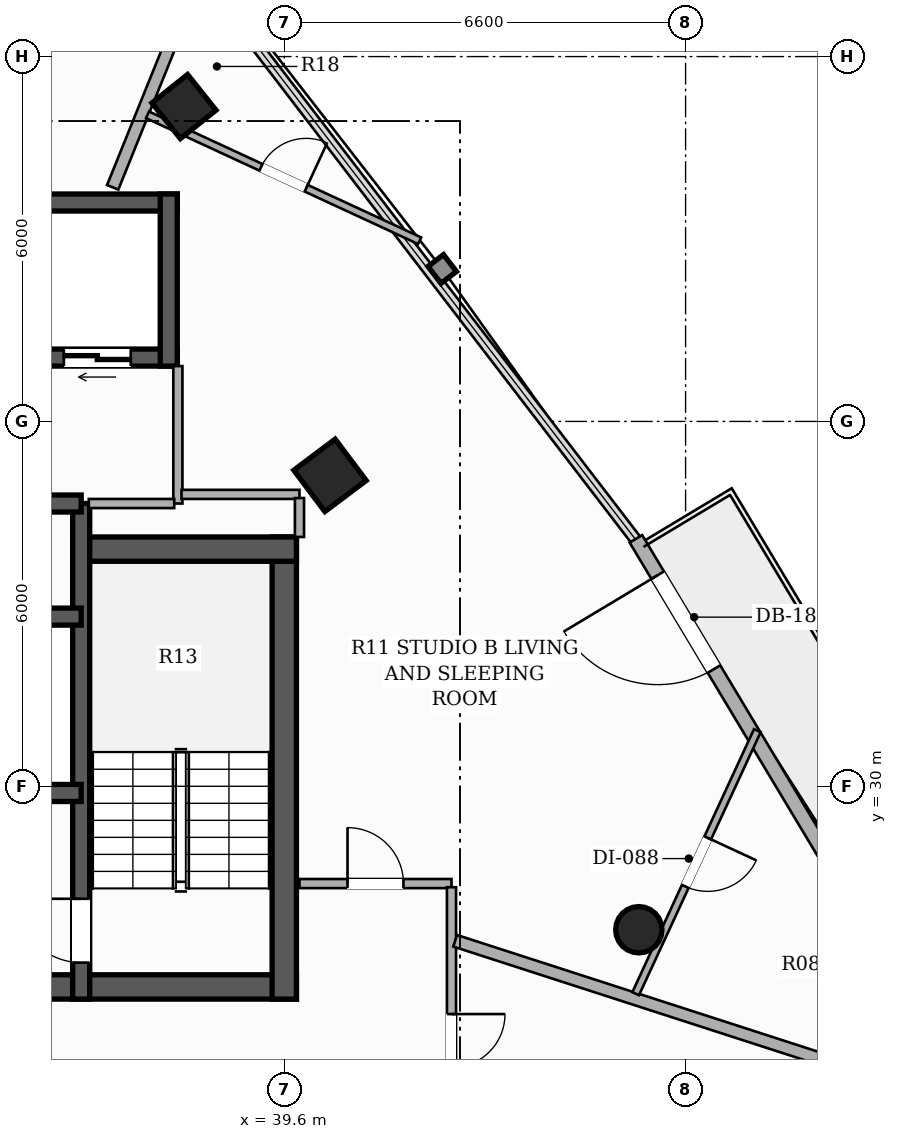
"""IFC4 building model, lengths in metres.
Left out: names, types, materials, properties, quantities, classifications, styles, units other than length and angle.
Written with IfcOpenShell. Run it as: python <this file> out.ifc"""

import sys

from ifc_helpers import new_model, si_unit, direction, frame, frame_2d, origin, origin_2d, place, context, subcontext, project, spatial, rectangle, hollow_rectangle, hollow_circle, extrude, element, fill, save


model = new_model("IFC4")
c1 = context("Model", 3, precision=1e-05, world=origin(), true_north=direction((0.0, 1.0)))
c2 = subcontext(c1, "Body", "Model", "MODEL_VIEW")
j1 = project(units=[si_unit("LENGTHUNIT", "METRE"), si_unit("PLANEANGLEUNIT", "RADIAN")], contexts=[c1])
p1 = place(None, origin())
s1 = spatial("IfcSite", under=j1, at=p1, CompositionType="ELEMENT")
p2 = place(p1, origin())
s2 = spatial("IfcBuilding", under=s1, at=p2, CompositionType="ELEMENT")
p3 = place(p2, frame((0.0, 0.0, 153.95)))
s3 = spatial("IfcBuildingStorey", under=s2, at=p3, CompositionType="ELEMENT", Elevation=153.95)
p4 = place(p3, frame((26.2, 26.7, 0.0), z_axis=(0.0, 0.0, 1.0), x_axis=(1.0, 0.0, 0.0)))
e1 = element("IfcWall", 1, at=p4, inside=s3, PredefinedType="SHEAR", context=c2, shape_type="SweptSolid", body=[
    extrude(rectangle(XDim=13.6, YDim=0.4, at=frame_2d((6.8, 0.0))), origin(), (0.0, 0.0, 1.0), 3.3),
])
p5 = place(p4, frame((4.35, 0.0, 0.0)))
e2 = element("IfcOpeningElement", 2, at=p5, cuts=e1, PredefinedType="OPENING", context=c2, shape_type="SweptSolid", body=[
    extrude(rectangle(XDim=1.05, YDim=2.15, at=frame_2d((0.525, 1.075))), frame((0.0, 0.21, 0.0), z_axis=(0.0, -1.0, 0.0), x_axis=(1.0, 0.0, 0.0)), (0.0, 0.0, 1.0), 0.42),
])
p6 = place(p4, frame((8.3, 0.0, 0.0)))
e3 = element("IfcOpeningElement", 3, at=p6, cuts=e1, PredefinedType="OPENING", context=c2, shape_type="SweptSolid", body=[
    extrude(rectangle(XDim=1.05, YDim=2.15, at=frame_2d((0.525, 1.075))), frame((0.0, 0.21, 0.0), z_axis=(0.0, -1.0, 0.0), x_axis=(1.0, 0.0, 0.0)), (0.0, 0.0, 1.0), 0.42),
])
p7 = place(p3, frame((39.6, 26.5, 0.0), z_axis=(0.0, 0.0, 1.0), x_axis=(0.0, 1.0, 0.0)))
e4 = element("IfcWall", 4, at=p7, inside=s3, PredefinedType="SHEAR", context=c2, shape_type="SweptSolid", body=[
    extrude(rectangle(XDim=7.6, YDim=0.4, at=frame_2d((3.8, 0.0))), origin(), (0.0, 0.0, 1.0), 3.3),
])
p8 = place(p3, frame((36.12, 33.9, 0.0), z_axis=(0.0, 0.0, 1.0), x_axis=(1.0, 0.0, 0.0)))
e5 = element("IfcWall", 5, at=p8, inside=s3, PredefinedType="SHEAR", context=c2, shape_type="SweptSolid", body=[
    extrude(rectangle(XDim=3.68, YDim=0.4, at=frame_2d((1.84, 0.0))), origin(), (0.0, 0.0, 1.0), 3.3),
])
p9 = place(p3, frame((36.26, 26.5, 0.0), z_axis=(0.0, 0.0, 1.0), x_axis=(0.0, 1.0, 0.0)))
e6 = element("IfcWall", 6, at=p9, inside=s3, PredefinedType="SHEAR", context=c2, shape_type="SweptSolid", body=[
    extrude(rectangle(XDim=8.15, YDim=0.28, at=frame_2d((4.075, 0.0))), origin(), (0.0, 0.0, 1.0), 3.3),
])
p10 = place(p9, frame((0.6, 0.0, 0.0)))
e7 = element("IfcOpeningElement", 7, at=p10, cuts=e6, PredefinedType="OPENING", context=c2, shape_type="SweptSolid", body=[
    extrude(rectangle(XDim=1.05, YDim=2.15, at=frame_2d((0.525, 1.075))), frame((0.0, 0.15, 0.0), z_axis=(0.0, -1.0, 0.0), x_axis=(1.0, 0.0, 0.0)), (0.0, 0.0, 1.0), 0.3),
])
p11 = place(p3, frame((36.26, 29.89, 0.0), z_axis=(0.0, 0.0, 1.0), x_axis=(-1.0, 0.0, 0.0)))
e8 = element("IfcWall", 8, at=p11, inside=s3, PredefinedType="SHEAR", context=c2, shape_type="SweptSolid", body=[
    extrude(rectangle(XDim=6.52, YDim=0.28, at=frame_2d((3.26, 0.0))), origin(), (0.0, 0.0, 1.0), 3.3),
])
p12 = place(p11, frame((4.875, 0.0, 0.0)))
e9 = element("IfcOpeningElement", 9, at=p12, cuts=e8, PredefinedType="OPENING", context=c2, shape_type="SweptSolid", body=[
    extrude(rectangle(XDim=1.1, YDim=2.2, at=frame_2d((0.55, 1.1))), frame((0.0, 0.15, 0.0), z_axis=(0.0, -1.0, 0.0), x_axis=(1.0, 0.0, 0.0)), (0.0, 0.0, 1.0), 0.3),
])
p13 = place(p11, frame((2.875, 0.0, 0.0)))
e10 = element("IfcOpeningElement", 10, at=p13, cuts=e8, PredefinedType="OPENING", context=c2, shape_type="SweptSolid", body=[
    extrude(rectangle(XDim=1.1, YDim=2.2, at=frame_2d((0.55, 1.1))), frame((0.0, 0.15, 0.0), z_axis=(0.0, -1.0, 0.0), x_axis=(1.0, 0.0, 0.0)), (0.0, 0.0, 1.0), 0.3),
])
p14 = place(p11, frame((0.6, 0.0, 0.0)))
e11 = element("IfcOpeningElement", 11, at=p14, cuts=e8, PredefinedType="OPENING", context=c2, shape_type="SweptSolid", body=[
    extrude(rectangle(XDim=1.3, YDim=2.2, at=frame_2d((0.65, 1.1))), frame((0.0, 0.15, 0.0), z_axis=(0.0, -1.0, 0.0), x_axis=(1.0, 0.0, 0.0)), (0.0, 0.0, 1.0), 0.3),
])
p15 = place(p3, frame((29.74, 32.79, 0.0), z_axis=(0.0, 0.0, 1.0), x_axis=(1.0, 0.0, 0.0)))
e12 = element("IfcWall", 12, at=p15, inside=s3, PredefinedType="SHEAR", context=c2, shape_type="SweptSolid", body=[
    extrude(rectangle(XDim=6.52, YDim=0.28, at=frame_2d((3.26, 0.0))), origin(), (0.0, 0.0, 1.0), 3.3),
])
p16 = place(p3, frame((29.74, 34.65, 0.0), z_axis=(0.0, 0.0, 1.0), x_axis=(1.0, 0.0, 0.0)))
e13 = element("IfcWall", 13, at=p16, inside=s3, PredefinedType="SHEAR", context=c2, shape_type="SweptSolid", body=[
    extrude(rectangle(XDim=6.52, YDim=0.28, at=frame_2d((3.26, 0.0))), origin(), (0.0, 0.0, 1.0), 3.3),
])
p17 = place(p16, frame((0.765, 0.0, 0.0)))
e14 = element("IfcOpeningElement", 14, at=p17, cuts=e13, PredefinedType="OPENING", context=c2, shape_type="SweptSolid", body=[
    extrude(rectangle(XDim=0.82, YDim=2.1, at=frame_2d((0.41, 1.05))), frame((0.0, 0.15, 0.0), z_axis=(0.0, -1.0, 0.0), x_axis=(1.0, 0.0, 0.0)), (0.0, 0.0, 1.0), 0.3),
])
p18 = place(p16, frame((2.84, 0.0, 0.0)))
e15 = element("IfcOpeningElement", 15, at=p18, cuts=e13, PredefinedType="OPENING", context=c2, shape_type="SweptSolid", body=[
    extrude(rectangle(XDim=0.82, YDim=2.1, at=frame_2d((0.41, 1.05))), frame((0.0, 0.15, 0.0), z_axis=(0.0, -1.0, 0.0), x_axis=(1.0, 0.0, 0.0)), (0.0, 0.0, 1.0), 0.3),
])
p19 = place(p16, frame((4.915, 0.0, 0.0)))
e16 = element("IfcOpeningElement", 16, at=p19, cuts=e13, PredefinedType="OPENING", context=c2, shape_type="SweptSolid", body=[
    extrude(rectangle(XDim=0.82, YDim=2.1, at=frame_2d((0.41, 1.05))), frame((0.0, 0.15, 0.0), z_axis=(0.0, -1.0, 0.0), x_axis=(1.0, 0.0, 0.0)), (0.0, 0.0, 1.0), 0.3),
])
p20 = place(p3, frame((37.84, 37.05, 0.0), z_axis=(0.0, 0.0, 1.0), x_axis=(-1.0, 0.0, 0.0)))
e17 = element("IfcWall", 17, at=p20, inside=s3, PredefinedType="SHEAR", context=c2, shape_type="SweptSolid", body=[
    extrude(rectangle(XDim=9.68, YDim=0.28, at=frame_2d((4.84, 0.0))), origin(), (0.0, 0.0, 1.0), 3.3),
])
p21 = place(p20, frame((7.815, 0.0, 0.0)))
e18 = element("IfcOpeningElement", 18, at=p21, cuts=e17, PredefinedType="OPENING", context=c2, shape_type="SweptSolid", body=[
    extrude(rectangle(XDim=1.1, YDim=2.2, at=frame_2d((0.55, 1.1))), frame((0.0, 0.15, 0.0), z_axis=(0.0, -1.0, 0.0), x_axis=(1.0, 0.0, 0.0)), (0.0, 0.0, 1.0), 0.3),
])
p22 = place(p20, frame((0.765, 0.0, 0.0)))
e19 = element("IfcOpeningElement", 19, at=p22, cuts=e17, PredefinedType="OPENING", context=c2, shape_type="SweptSolid", body=[
    extrude(rectangle(XDim=1.1, YDim=2.2, at=frame_2d((0.55, 1.1))), frame((0.0, 0.15, 0.0), z_axis=(0.0, -1.0, 0.0), x_axis=(1.0, 0.0, 0.0)), (0.0, 0.0, 1.0), 0.3),
])
p23 = place(p3, frame((28.16, 39.6, 0.0), z_axis=(0.0, 0.0, 1.0), x_axis=(1.0, 0.0, 0.0)))
e20 = element("IfcWall", 20, at=p23, inside=s3, PredefinedType="SHEAR", context=c2, shape_type="SweptSolid", body=[
    extrude(rectangle(XDim=9.68, YDim=0.28, at=frame_2d((4.84, 0.0))), origin(), (0.0, 0.0, 1.0), 3.3),
])
p24 = place(p3, frame((37.7, 36.91, 0.0), z_axis=(0.0, 0.0, 1.0), x_axis=(0.0, 1.0, 0.0)))
e21 = element("IfcWall", 21, at=p24, inside=s3, PredefinedType="SHEAR", context=c2, shape_type="SweptSolid", body=[
    extrude(rectangle(XDim=2.83, YDim=0.28, at=frame_2d((1.415, 0.0))), origin(), (0.0, 0.0, 1.0), 3.3),
])
p25 = place(p3, frame((45.431, 27.641, 0.0), z_axis=(0.0, 0.0, 1.0), x_axis=(1.0, 0.0, 0.0)))
e22 = element("IfcColumn", 22, at=p25, inside=s3, PredefinedType="COLUMN", context=c2, shape_type="SweptSolid", body=[
    extrude(hollow_circle(Radius=0.381, WallThickness=0.022, at=origin_2d()), origin(), (0.0, 0.0, 1.0), 3.3),
])
p26 = place(p3, frame((40.352, 35.113, 0.0), z_axis=(0.0, 0.0, 1.0), x_axis=(-0.600420225326, 0.799684658487, 0.0)))
e23 = element("IfcColumn", 23, at=p26, inside=s3, PredefinedType="COLUMN", context=c2, shape_type="SweptSolid", body=[
    extrude(hollow_rectangle(XDim=0.85, YDim=0.85, WallThickness=0.028, at=origin_2d()), origin(), (0.0, 0.0, 1.0), 3.3),
])
p27 = place(p3, frame((37.95, 41.178, 0.0), z_axis=(0.0, 0.0, 1.0), x_axis=(-0.623879596709, 0.781520472419, 0.0)))
e24 = element("IfcColumn", 24, at=p27, inside=s3, PredefinedType="COLUMN", context=c2, shape_type="SweptSolid", body=[
    extrude(hollow_rectangle(XDim=0.75, YDim=0.75, WallThickness=0.025, at=origin_2d()), origin(), (0.0, 0.0, 1.0), 3.3),
])
p28 = place(p3, frame((51.155, 24.445, 0.0), z_axis=(0.0, 0.0, 1.0), x_axis=(-0.514335781973, 0.857588889493, 0.0)))
e25 = element("IfcWall", 25, at=p28, inside=s3, PredefinedType="SOLIDWALL", context=c2, shape_type="SweptSolid", body=[
    extrude(rectangle(XDim=11.222, YDim=0.24, at=frame_2d((5.611, 0.0))), origin(), (0.0, 0.0, 1.0), 2.624),
])
p29 = place(p28, frame((8.725, 0.0, 0.0)))
e26 = element("IfcOpeningElement", 26, at=p29, cuts=e25, PredefinedType="OPENING", context=c2, shape_type="SweptSolid", body=[
    extrude(rectangle(XDim=1.8, YDim=2.2, at=frame_2d((0.9, 1.1))), frame((0.0, 0.13, 0.0), z_axis=(0.0, -1.0, 0.0), x_axis=(1.0, 0.0, 0.0)), (0.0, 0.0, 1.0), 0.26),
])
p30 = place(p3, frame((37.85, 34.65, 0.0), z_axis=(0.0, 0.0, 1.0), x_axis=(0.0, 1.0, 0.0)))
e27 = element("IfcWall", 27, at=p30, inside=s3, PredefinedType="PARTITIONING", context=c2, shape_type="SweptSolid", body=[
    extrude(rectangle(XDim=2.26, YDim=0.15, at=frame_2d((1.13, 0.0))), origin(), (0.0, 0.0, 1.0), 3.06),
])
p31 = place(p3, frame((36.385, 34.65, 0.0), z_axis=(0.0, 0.0, 1.0), x_axis=(1.0, 0.0, 0.0)))
e28 = element("IfcWall", 28, at=p31, inside=s3, PredefinedType="PARTITIONING", context=c2, shape_type="SweptSolid", body=[
    extrude(rectangle(XDim=1.405, YDim=0.15, at=frame_2d((0.703, 0.0))), origin(), (0.0, 0.0, 1.0), 2.425),
])
p32 = place(p3, frame((39.85, 28.4, 0.0), z_axis=(0.0, 0.0, 1.0), x_axis=(1.0, 0.0, 0.0)))
e29 = element("IfcWall", 29, at=p32, inside=s3, PredefinedType="PARTITIONING", context=c2, shape_type="SweptSolid", body=[
    extrude(rectangle(XDim=2.5, YDim=0.15, at=frame_2d((1.25, 0.0))), origin(), (0.0, 0.0, 1.0), 2.721),
])
p33 = place(p32, frame((0.79, 0.0, 0.0)))
e30 = element("IfcOpeningElement", 30, at=p33, cuts=e29, PredefinedType="OPENING", context=c2, shape_type="SweptSolid", body=[
    extrude(rectangle(XDim=0.92, YDim=2.15, at=frame_2d((0.46, 1.075))), frame((0.0, 0.085, 0.0), z_axis=(0.0, -1.0, 0.0), x_axis=(1.0, 0.0, 0.0)), (0.0, 0.0, 1.0), 0.17),
])
p34 = place(p3, frame((42.35, 28.34, 0.0), z_axis=(0.0, 0.0, 1.0), x_axis=(0.0, -1.0, 0.0)))
e31 = element("IfcWall", 31, at=p34, inside=s3, PredefinedType="PARTITIONING", context=c2, shape_type="SweptSolid", body=[
    extrude(rectangle(XDim=4.49, YDim=0.15, at=frame_2d((2.245, 0.0))), origin(), (0.0, 0.0, 1.0), 2.721),
])
p35 = place(p34, frame((2.086, 0.0, 0.0)))
e32 = element("IfcOpeningElement", 32, at=p35, cuts=e31, PredefinedType="OPENING", context=c2, shape_type="SweptSolid", body=[
    extrude(rectangle(XDim=0.88, YDim=2.1, at=frame_2d((0.44, 1.05))), frame((0.0, 0.085, 0.0), z_axis=(0.0, -1.0, 0.0), x_axis=(1.0, 0.0, 0.0)), (0.0, 0.0, 1.0), 0.17),
])
p36 = place(p3, frame((37.91, 34.8, 0.0), z_axis=(0.0, 0.0, 1.0), x_axis=(1.0, 0.0, 0.0)))
e33 = element("IfcWall", 33, at=p36, inside=s3, PredefinedType="PARTITIONING", context=c2, shape_type="SweptSolid", body=[
    extrude(rectangle(XDim=1.94, YDim=0.15, at=frame_2d((0.97, 0.0))), origin(), (0.0, 0.0, 1.0), 2.721),
])
p37 = place(p3, frame((39.85, 34.74, 0.0), z_axis=(0.0, 0.0, 1.0), x_axis=(0.0, -1.0, 0.0)))
e34 = element("IfcWall", 34, at=p37, inside=s3, PredefinedType="PARTITIONING", context=c2, shape_type="SweptSolid", body=[
    extrude(rectangle(XDim=0.64, YDim=0.15, at=frame_2d((0.32, 0.0))), origin(), (0.0, 0.0, 1.0), 2.721),
])
p38 = place(p3, frame((42.41, 27.459, 0.0), z_axis=(0.0, 0.0, 1.0), x_axis=(0.951531988225, -0.307549793343, 0.0)))
e35 = element("IfcWall", 35, at=p38, inside=s3, PredefinedType="PARTITIONING", context=c2, shape_type="SweptSolid", body=[
    extrude(rectangle(XDim=9.036, YDim=0.2, at=frame_2d((4.518, 0.0))), origin(), (0.0, 0.0, 1.0), 2.413),
])
p39 = place(p3, frame((36.778, 39.85, 0.0), z_axis=(0.0, 0.0, 1.0), x_axis=(0.374430412004, 0.927255017008, 0.0)))
e36 = element("IfcWall", 36, at=p39, inside=s3, PredefinedType="PARTITIONING", context=c2, shape_type="SweptSolid", body=[
    extrude(rectangle(XDim=3.958, YDim=0.2, at=frame_2d((1.979, 0.0))), origin(), (0.0, 0.0, 1.0), 2.413),
])
p40 = place(p3, frame((37.351, 41.042, 0.0), z_axis=(0.0, 0.0, 1.0), x_axis=(0.907592371503, -0.419852458834, 0.0)))
e37 = element("IfcWall", 37, at=p40, inside=s3, PredefinedType="PARTITIONING", context=c2, shape_type="SweptSolid", body=[
    extrude(rectangle(XDim=4.93, YDim=0.12, at=frame_2d((2.465, 0.0))), origin(), (0.0, 0.0, 1.0), 2.413),
])
p41 = place(p40, frame((2.055, 0.0, 0.0)))
e38 = element("IfcOpeningElement", 38, at=p41, cuts=e37, PredefinedType="OPENING", context=c2, shape_type="SweptSolid", body=[
    extrude(rectangle(XDim=0.82, YDim=2.1, at=frame_2d((0.41, 1.05))), frame((0.0, 0.07, 0.0), z_axis=(0.0, -1.0, 0.0), x_axis=(1.0, 0.0, 0.0)), (0.0, 0.0, 1.0), 0.14),
])
p42 = place(p3, frame((47.38, 30.915, 0.0), z_axis=(0.0, 0.0, 1.0), x_axis=(-0.419818119852, -0.907608255936, 0.0)))
e39 = element("IfcWall", 39, at=p42, inside=s3, PredefinedType="PARTITIONING", context=c2, shape_type="SweptSolid", body=[
    extrude(rectangle(XDim=4.766, YDim=0.12, at=frame_2d((2.383, 0.0))), origin(), (0.0, 0.0, 1.0), 2.413),
])
p43 = place(p42, frame((1.943, 0.0, 0.0)))
e40 = element("IfcOpeningElement", 40, at=p43, cuts=e39, PredefinedType="OPENING", context=c2, shape_type="SweptSolid", body=[
    extrude(rectangle(XDim=0.88, YDim=2.1, at=frame_2d((0.44, 1.05))), frame((0.0, 0.07, 0.0), z_axis=(0.0, -1.0, 0.0), x_axis=(1.0, 0.0, 0.0)), (0.0, 0.0, 1.0), 0.14),
])
p44 = place(p29, origin())
e41 = element("IfcDoor", 41, at=p44, inside=s3, OperationType="SINGLE_SWING_RIGHT", PredefinedType="DOOR", context=c2, shape_type="SweptSolid", body=[
    extrude(rectangle(XDim=1.8, YDim=2.2, at=frame_2d((0.9, 1.1))), frame((0.0, 0.025, 0.0), z_axis=(0.0, -1.0, 0.0), x_axis=(1.0, 0.0, 0.0)), (0.0, 0.0, 1.0), 0.05),
])
fill(e26, e41)
p45 = place(p10, origin())
e42 = element("IfcDoor", 42, at=p45, inside=s3, OperationType="SINGLE_SWING_RIGHT", PredefinedType="DOOR", context=c2, shape_type="SweptSolid", body=[
    extrude(rectangle(XDim=1.05, YDim=2.15, at=frame_2d((0.525, 1.075))), frame((0.0, 0.025, 0.0), z_axis=(0.0, -1.0, 0.0), x_axis=(1.0, 0.0, 0.0)), (0.0, 0.0, 1.0), 0.05),
])
fill(e7, e42)
p46 = place(p22, origin())
e43 = element("IfcDoor", 43, at=p46, inside=s3, OperationType="DOUBLE_DOOR_SLIDING", PredefinedType="DOOR", context=c2, shape_type="SweptSolid", body=[
    extrude(rectangle(XDim=1.1, YDim=2.2, at=frame_2d((0.55, 1.1))), frame((0.0, 0.025, 0.0), z_axis=(0.0, -1.0, 0.0), x_axis=(1.0, 0.0, 0.0)), (0.0, 0.0, 1.0), 0.05),
])
fill(e19, e43)
p47 = place(p35, origin())
e44 = element("IfcDoor", 44, at=p47, inside=s3, OperationType="SINGLE_SWING_LEFT", PredefinedType="DOOR", context=c2, shape_type="SweptSolid", body=[
    extrude(rectangle(XDim=0.88, YDim=2.1, at=frame_2d((0.44, 1.05))), frame((0.0, 0.025, 0.0), z_axis=(0.0, -1.0, 0.0), x_axis=(1.0, 0.0, 0.0)), (0.0, 0.0, 1.0), 0.05),
])
fill(e32, e44)
p48 = place(p33, origin())
e45 = element("IfcDoor", 45, at=p48, inside=s3, OperationType="SINGLE_SWING_LEFT", PredefinedType="DOOR", context=c2, shape_type="SweptSolid", body=[
    extrude(rectangle(XDim=0.92, YDim=2.15, at=frame_2d((0.46, 1.075))), frame((0.0, 0.025, 0.0), z_axis=(0.0, -1.0, 0.0), x_axis=(1.0, 0.0, 0.0)), (0.0, 0.0, 1.0), 0.05),
])
fill(e30, e45)
p49 = place(p41, origin())
e46 = element("IfcDoor", 46, at=p49, inside=s3, OperationType="SINGLE_SWING_RIGHT", PredefinedType="DOOR", context=c2, shape_type="SweptSolid", body=[
    extrude(rectangle(XDim=0.82, YDim=2.1, at=frame_2d((0.41, 1.05))), frame((0.0, 0.025, 0.0), z_axis=(0.0, -1.0, 0.0), x_axis=(1.0, 0.0, 0.0)), (0.0, 0.0, 1.0), 0.05),
])
fill(e38, e46)
p50 = place(p43, origin())
e47 = element("IfcDoor", 47, at=p50, inside=s3, OperationType="SINGLE_SWING_LEFT", PredefinedType="DOOR", context=c2, shape_type="SweptSolid", body=[
    extrude(rectangle(XDim=0.88, YDim=2.1, at=frame_2d((0.44, 1.05))), frame((0.0, 0.025, 0.0), z_axis=(0.0, -1.0, 0.0), x_axis=(1.0, 0.0, 0.0)), (0.0, 0.0, 1.0), 0.05),
])
fill(e40, e47)
save(model, sys.argv[1])
